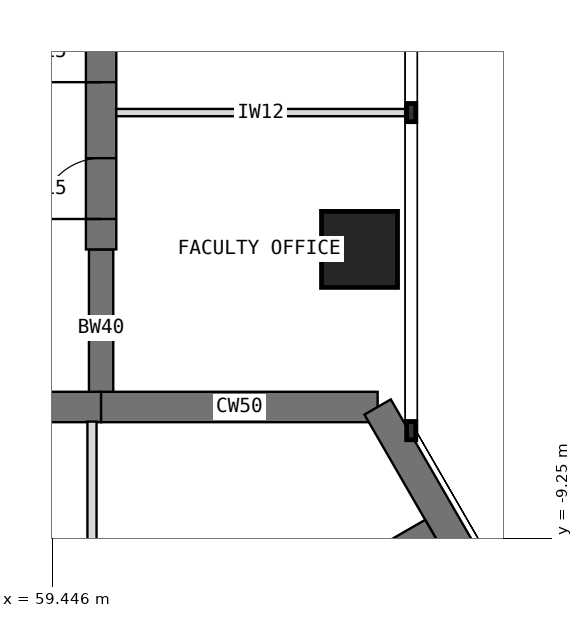
"""IFC4 building model, lengths in metres.
Left out: names, types, materials, properties, quantities, classifications, styles, units other than length and angle.
Written with IfcOpenShell. Run it as: python <this file> out.ifc"""

import sys

from ifc_helpers import new_model, si_unit, direction, frame, frame_2d, origin, origin_2d, place, context, subcontext, project, spatial, rectangle, extrude, element, fill, save


model = new_model("IFC4")
c1 = context("Model", 3, precision=1e-05, world=origin(), true_north=direction((0.0, 1.0)))
c2 = subcontext(c1, "Body", "Model", "MODEL_VIEW")
j1 = project(units=[si_unit("LENGTHUNIT", "METRE"), si_unit("PLANEANGLEUNIT", "RADIAN")], contexts=[c1])
p1 = place(None, origin())
s1 = spatial("IfcSite", under=j1, at=p1, CompositionType="ELEMENT")
p2 = place(p1, origin())
s2 = spatial("IfcBuilding", under=s1, at=p2, CompositionType="ELEMENT")
p3 = place(p2, frame((0.0, 0.0, 170.5)))
s3 = spatial("IfcBuildingStorey", under=s2, at=p3, CompositionType="ELEMENT", Elevation=170.5)
p4 = place(p3, frame((64.798, -7.092, 0.0), z_axis=(0.0, 0.0, 1.0), x_axis=(-1.0, 0.0, 0.0)))
e1 = element("IfcWall", 1, at=p4, inside=s3, PredefinedType="SHEAR", context=c2, shape_type="SweptSolid", body=[
    extrude(rectangle(XDim=4.548, YDim=0.5, at=frame_2d((2.274, 0.0))), origin(), (0.0, 0.0, 1.0), 4.0),
])
p5 = place(p3, frame((60.25, -7.092, 0.0), z_axis=(0.0, 0.0, 1.0), x_axis=(-1.0, 0.0, 0.0)))
e2 = element("IfcWall", 2, at=p5, inside=s3, PredefinedType="SHEAR", context=c2, shape_type="SweptSolid", body=[
    extrude(rectangle(XDim=3.5, YDim=0.5, at=frame_2d((1.75, 0.0))), origin(), (0.0, 0.0, 1.0), 4.0),
])
p6 = place(p5, frame((0.85, 0.0, 0.0)))
e3 = element("IfcOpeningElement", 3, at=p6, cuts=e2, PredefinedType="OPENING", context=c2, shape_type="SweptSolid", body=[
    extrude(rectangle(XDim=1.8, YDim=2.1, at=frame_2d((0.9, 1.05))), frame((0.0, 0.26, 0.0), z_axis=(0.0, -1.0, 0.0), x_axis=(1.0, 0.0, 0.0)), (0.0, 0.0, 1.0), 0.52),
])
p7 = place(p3, frame((71.096, -18.0, 0.0), z_axis=(0.0, 0.0, 1.0), x_axis=(-0.500005998175, 0.866021940709, 0.0)))
e4 = element("IfcWall", 4, at=p7, inside=s3, PredefinedType="SHEAR", context=c2, shape_type="SweptSolid", body=[
    extrude(rectangle(XDim=12.596, YDim=0.5, at=frame_2d((6.298, 0.0))), origin(), (0.0, 0.0, 1.0), 4.0),
])
p8 = place(p3, frame((60.25, -7.092, 0.0), z_axis=(0.0, 0.0, 1.0), x_axis=(0.0, 1.0, 0.0)))
e5 = element("IfcWall", 5, at=p8, inside=s3, PredefinedType="SHEAR", context=c2, shape_type="SweptSolid", body=[
    extrude(rectangle(XDim=2.592, YDim=0.4, at=frame_2d((1.296, 0.0))), origin(), (0.0, 0.0, 1.0), 4.0),
])
p9 = place(p3, frame((60.25, -4.5, 0.0), z_axis=(0.0, 0.0, 1.0), x_axis=(0.0, 1.0, 0.0)))
e6 = element("IfcWall", 6, at=p9, inside=s3, PredefinedType="SHEAR", context=c2, shape_type="SweptSolid", body=[
    extrude(rectangle(XDim=13.2, YDim=0.5, at=frame_2d((6.6, 0.0))), origin(), (0.0, 0.0, 1.0), 4.0),
])
p10 = place(p9, frame((0.5, 0.0, 0.0)))
e7 = element("IfcOpeningElement", 7, at=p10, cuts=e6, PredefinedType="OPENING", context=c2, shape_type="SweptSolid", body=[
    extrude(rectangle(XDim=1.0, YDim=2.1, at=frame_2d((0.5, 1.05))), frame((0.0, 0.26, 0.0), z_axis=(0.0, -1.0, 0.0), x_axis=(1.0, 0.0, 0.0)), (0.0, 0.0, 1.0), 0.52),
])
p11 = place(p9, frame((2.75, 0.0, 0.0)))
e8 = element("IfcOpeningElement", 8, at=p11, cuts=e6, PredefinedType="OPENING", context=c2, shape_type="SweptSolid", body=[
    extrude(rectangle(XDim=1.0, YDim=2.1, at=frame_2d((0.5, 1.05))), frame((0.0, 0.26, 0.0), z_axis=(0.0, -1.0, 0.0), x_axis=(1.0, 0.0, 0.0)), (0.0, 0.0, 1.0), 0.52),
])
p12 = place(p9, frame((7.25, 0.0, 0.0)))
e9 = element("IfcOpeningElement", 9, at=p12, cuts=e6, PredefinedType="OPENING", context=c2, shape_type="SweptSolid", body=[
    extrude(rectangle(XDim=1.0, YDim=2.1, at=frame_2d((0.5, 1.05))), frame((0.0, 0.26, 0.0), z_axis=(0.0, -1.0, 0.0), x_axis=(1.0, 0.0, 0.0)), (0.0, 0.0, 1.0), 0.52),
])
p13 = place(p3, frame((64.5, -4.5, 0.0), z_axis=(0.0, 0.0, 1.0), x_axis=(1.0, 0.0, 0.0)))
e10 = element("IfcColumn", 10, at=p13, inside=s3, PredefinedType="COLUMN", context=c2, shape_type="SweptSolid", body=[
    extrude(rectangle(XDim=1.25, YDim=1.25, at=origin_2d()), origin(), (0.0, 0.0, 1.0), 4.0),
])
p14 = place(p3, frame((60.52, -12.099, 0.0), z_axis=(0.0, 0.0, 1.0), x_axis=(0.86602319114, 0.500003832394, 0.0)))
e11 = element("IfcWall", 11, at=p14, inside=s3, PredefinedType="SHEAR", context=c2, shape_type="SweptSolid", body=[
    extrude(rectangle(XDim=5.958, YDim=0.4, at=frame_2d((2.979, 0.0))), origin(), (0.0, 0.0, 1.0), 4.0),
])
p15 = place(p3, frame((60.5, -2.25, 0.0), z_axis=(0.0, 0.0, 1.0), x_axis=(1.0, 0.0, 0.0)))
e12 = element("IfcWall", 12, at=p15, inside=s3, PredefinedType="PARTITIONING", context=c2, shape_type="SweptSolid", body=[
    extrude(rectangle(XDim=4.75, YDim=0.12, at=frame_2d((2.375, 0.0))), origin(), (0.0, 0.0, 1.0), 3.8),
])
p16 = place(p3, frame((60.1, -7.332, 0.0), z_axis=(0.0, 0.0, 1.0), x_axis=(0.0, -1.0, 0.0)))
e13 = element("IfcWall", 13, at=p16, inside=s3, PredefinedType="PARTITIONING", context=c2, shape_type="SweptSolid", body=[
    extrude(rectangle(XDim=5.146, YDim=0.15, at=frame_2d((2.573, 0.0))), origin(), (0.0, 0.0, 1.0), 3.8),
])
p17 = place(p16, frame((3.088, 0.0, 0.0)))
e14 = element("IfcOpeningElement", 14, at=p17, cuts=e13, PredefinedType="OPENING", context=c2, shape_type="SweptSolid", body=[
    extrude(rectangle(XDim=1.0, YDim=2.1, at=frame_2d((0.5, 1.05))), frame((0.0, 0.085, 0.0), z_axis=(0.0, -1.0, 0.0), x_axis=(1.0, 0.0, 0.0)), (0.0, 0.0, 1.0), 0.17),
])
p18 = place(p10, origin())
e15 = element("IfcDoor", 15, at=p18, inside=s3, OperationType="SINGLE_SWING_LEFT", PredefinedType="DOOR", context=c2, shape_type="SweptSolid", body=[
    extrude(rectangle(XDim=1.0, YDim=2.1, at=frame_2d((0.5, 1.05))), frame((0.0, 0.025, 0.0), z_axis=(0.0, -1.0, 0.0), x_axis=(1.0, 0.0, 0.0)), (0.0, 0.0, 1.0), 0.05),
])
fill(e7, e15)
p19 = place(p11, origin())
e16 = element("IfcDoor", 16, at=p19, inside=s3, OperationType="SINGLE_SWING_LEFT", PredefinedType="DOOR", context=c2, shape_type="SweptSolid", body=[
    extrude(rectangle(XDim=1.0, YDim=2.1, at=frame_2d((0.5, 1.05))), frame((0.0, 0.025, 0.0), z_axis=(0.0, -1.0, 0.0), x_axis=(1.0, 0.0, 0.0)), (0.0, 0.0, 1.0), 0.05),
])
fill(e8, e16)
save(model, sys.argv[1])
